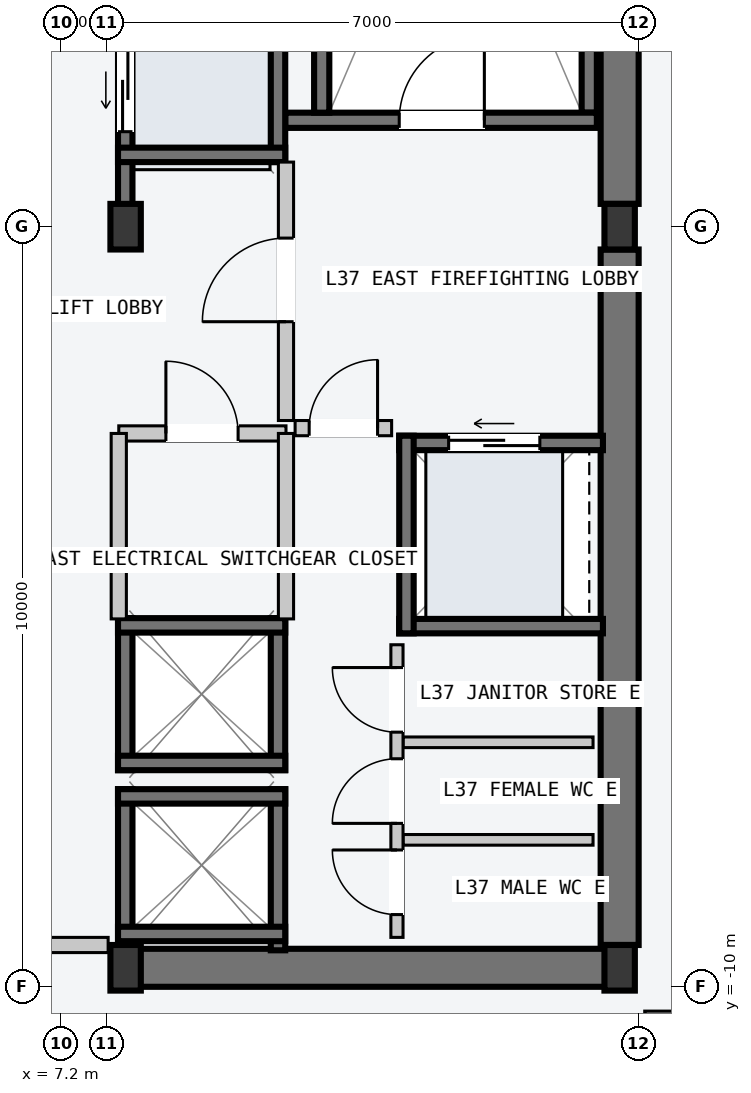
"""IFC4 building model, lengths in metres.
Left out: names, types, materials, properties, quantities, classifications, styles, units other than length and angle.
Written with IfcOpenShell. Run it as: python <this file> out.ifc"""

import sys

from ifc_helpers import new_model, si_unit, direction, frame, frame_2d, origin, origin_2d, place, context, subcontext, project, spatial, rectangle, i_section, extrude, element, fill, save


model = new_model("IFC4")
c1 = context("Model", 3, precision=1e-05, world=origin(), true_north=direction((0.0, 1.0)))
c2 = subcontext(c1, "Body", "Model", "MODEL_VIEW")
j1 = project(units=[si_unit("LENGTHUNIT", "METRE"), si_unit("PLANEANGLEUNIT", "RADIAN")], contexts=[c1])
p1 = place(None, origin())
s1 = spatial("IfcSite", under=j1, at=p1, CompositionType="ELEMENT")
p2 = place(p1, origin())
s2 = spatial("IfcBuilding", under=s1, at=p2, CompositionType="ELEMENT")
p3 = place(p2, frame((0.0, 0.0, 142.2)))
s3 = spatial("IfcBuildingStorey", under=s2, at=p3, CompositionType="ELEMENT", Elevation=142.2)
p4 = place(p3, frame((8.07, -9.75, -0.2), z_axis=(0.0, 0.0, 1.0), x_axis=(1.0, 0.0, 0.0)))
e1 = element("IfcWall", 1, at=p4, inside=s3, PredefinedType="SHEAR", context=c2, shape_type="SweptSolid", body=[
    extrude(rectangle(XDim=6.46, YDim=0.5, at=frame_2d((3.23, 0.0))), origin(), (0.0, 0.0, 1.0), 3.6),
])
for number, where, z_axis, x_axis in (
    (2, (14.55, -9.45, -0.2), (0.0, 0.0, 1.0), (0.0, 1.0, 0.0)),
    (3, (14.55, 0.3, -0.2), (0.0, 0.0, 1.0), (0.0, 1.0, 0.0)),
):
    element("IfcWall", number, at=place(p3, frame(where, z_axis=z_axis, x_axis=x_axis)), inside=s3, PredefinedType="SHEAR", context=c2, shape_type="SweptSolid", body=[
        extrude(rectangle(XDim=9.15, YDim=0.5, at=frame_2d((4.575, 0.0))), origin(), (0.0, 0.0, 1.0), 3.6),
    ])
p5 = place(p3, frame((14.15, 1.5, -0.2), z_axis=(0.0, 0.0, 1.0), x_axis=(0.0, 1.0, 0.0)))
e4 = element("IfcWall", 4, at=p5, inside=s3, PredefinedType="SOLIDWALL", context=c2, shape_type="SweptSolid", body=[
    extrude(rectangle(XDim=7.8, YDim=0.2, at=frame_2d((3.9, 0.0))), origin(), (0.0, 0.0, 1.0), 3.6),
])
p6 = place(p3, frame((10.15, 1.4, -0.2), z_axis=(0.0, 0.0, 1.0), x_axis=(1.0, 0.0, 0.0)))
e5 = element("IfcWall", 5, at=p6, inside=s3, PredefinedType="SOLIDWALL", context=c2, shape_type="SweptSolid", body=[
    extrude(rectangle(XDim=4.1, YDim=0.2, at=frame_2d((2.05, 0.0))), origin(), (0.0, 0.0, 1.0), 3.6),
])
p7 = place(p6, frame((1.5, 0.0, 0.2)))
e6 = element("IfcOpeningElement", 6, at=p7, cuts=e5, PredefinedType="OPENING", context=c2, shape_type="SweptSolid", body=[
    extrude(rectangle(XDim=1.12, YDim=2.18, at=frame_2d((0.56, 1.09))), frame((0.0, 0.11, 0.0), z_axis=(0.0, -1.0, 0.0), x_axis=(1.0, 0.0, 0.0)), (0.0, 0.0, 1.0), 0.22),
])
p8 = place(p3, frame((10.63, 1.5, -0.2), z_axis=(0.0, 0.0, 1.0), x_axis=(0.0, 1.0, 0.0)))
e7 = element("IfcWall", 7, at=p8, inside=s3, PredefinedType="SOLIDWALL", context=c2, shape_type="SweptSolid", body=[
    extrude(rectangle(XDim=7.8, YDim=0.2, at=frame_2d((3.9, 0.0))), origin(), (0.0, 0.0, 1.0), 3.6),
])
for number, where, z_axis, x_axis in (
    (8, (8.05, -9.75, 0.0), (0.0, 0.0, 1.0), (1.0, 0.0, 0.0)),
    (9, (8.05, 0.0, 0.0), (0.0, 0.0, 1.0), (1.0, 0.0, 0.0)),
    (10, (14.55, -9.75, 0.0), (0.0, 0.0, 1.0), (1.0, 0.0, 0.0)),
    (11, (14.55, 0.0, 0.0), (0.0, 0.0, 1.0), (1.0, 0.0, 0.0)),
):
    element("IfcColumn", number, at=place(p3, frame(where, z_axis=z_axis, x_axis=x_axis)), inside=s3, PredefinedType="COLUMN", context=c2, shape_type="SweptSolid", body=[
        extrude(i_section(OverallWidth=0.4, OverallDepth=0.6, WebThickness=0.022, FlangeThickness=0.036, at=origin_2d()), origin(), (0.0, 0.0, 1.0), 3.6),
    ])
p9 = place(p3, frame((8.045, 0.21, -0.2), z_axis=(0.0, 0.0, 1.0), x_axis=(0.0, 1.0, 0.0)))
e12 = element("IfcWall", 12, at=p9, inside=s3, PredefinedType="SOLIDWALL", context=c2, shape_type="SweptSolid", body=[
    extrude(rectangle(XDim=2.54, YDim=0.19, at=frame_2d((1.27, 0.0))), origin(), (0.0, 0.0, 1.0), 3.6),
])
p10 = place(p9, frame((1.04, 0.0, 0.2)))
e13 = element("IfcOpeningElement", 13, at=p10, cuts=e12, PredefinedType="OPENING", context=c2, shape_type="SweptSolid", body=[
    extrude(rectangle(XDim=1.1, YDim=2.2, at=frame_2d((0.55, 1.1))), frame((0.0, 0.105, 0.0), z_axis=(0.0, -1.0, 0.0), x_axis=(1.0, 0.0, 0.0)), (0.0, 0.0, 1.0), 0.21),
])
p11 = place(p3, frame((10.055, 0.85, -0.2), z_axis=(0.0, 0.0, 1.0), x_axis=(0.0, 1.0, 0.0)))
e14 = element("IfcWall", 14, at=p11, inside=s3, PredefinedType="SOLIDWALL", context=c2, shape_type="SweptSolid", body=[
    extrude(rectangle(XDim=1.9, YDim=0.19, at=frame_2d((0.95, 0.0))), origin(), (0.0, 0.0, 1.0), 3.6),
])
p12 = place(p3, frame((7.95, 0.945, -0.2), z_axis=(0.0, 0.0, 1.0), x_axis=(1.0, 0.0, 0.0)))
e15 = element("IfcWall", 15, at=p12, inside=s3, PredefinedType="SOLIDWALL", context=c2, shape_type="SweptSolid", body=[
    extrude(rectangle(XDim=2.2, YDim=0.19, at=frame_2d((1.1, 0.0))), origin(), (0.0, 0.0, 1.0), 3.6),
])
for number, where, z_axis, x_axis in (
    (16, (8.045, -9.52, -0.2), (0.0, 0.0, 1.0), (0.0, 1.0, 0.0)),
    (17, (10.055, -9.52, -0.2), (0.0, 0.0, 1.0), (0.0, 1.0, 0.0)),
):
    element("IfcWall", number, at=place(p3, frame(where, z_axis=z_axis, x_axis=x_axis)), inside=s3, PredefinedType="SOLIDWALL", context=c2, shape_type="SweptSolid", body=[
        extrude(rectangle(XDim=2.12, YDim=0.19, at=frame_2d((1.06, 0.0))), origin(), (0.0, 0.0, 1.0), 3.6),
    ])
for number, where, z_axis, x_axis in (
    (18, (7.95, -7.495, -0.2), (0.0, 0.0, 1.0), (1.0, 0.0, 0.0)),
    (19, (7.95, -9.305, -0.2), (0.0, 0.0, 1.0), (1.0, 0.0, 0.0)),
):
    element("IfcWall", number, at=place(p3, frame(where, z_axis=z_axis, x_axis=x_axis)), inside=s3, PredefinedType="SOLIDWALL", context=c2, shape_type="SweptSolid", body=[
        extrude(rectangle(XDim=2.2, YDim=0.19, at=frame_2d((1.1, 0.0))), origin(), (0.0, 0.0, 1.0), 3.6),
    ])
for number, where, z_axis, x_axis in (
    (20, (8.045, -7.15, -0.2), (0.0, 0.0, 1.0), (0.0, 1.0, 0.0)),
    (21, (10.055, -7.15, -0.2), (0.0, 0.0, 1.0), (0.0, 1.0, 0.0)),
):
    element("IfcWall", number, at=place(p3, frame(where, z_axis=z_axis, x_axis=x_axis)), inside=s3, PredefinedType="SOLIDWALL", context=c2, shape_type="SweptSolid", body=[
        extrude(rectangle(XDim=2.0, YDim=0.19, at=frame_2d((1.0, 0.0))), origin(), (0.0, 0.0, 1.0), 3.6),
    ])
for number, where, z_axis, x_axis in (
    (22, (7.95, -5.245, -0.2), (0.0, 0.0, 1.0), (1.0, 0.0, 0.0)),
    (23, (7.95, -7.055, -0.2), (0.0, 0.0, 1.0), (1.0, 0.0, 0.0)),
):
    element("IfcWall", number, at=place(p3, frame(where, z_axis=z_axis, x_axis=x_axis)), inside=s3, PredefinedType="SOLIDWALL", context=c2, shape_type="SweptSolid", body=[
        extrude(rectangle(XDim=2.2, YDim=0.19, at=frame_2d((1.1, 0.0))), origin(), (0.0, 0.0, 1.0), 3.6),
    ])
p13 = place(p3, frame((11.65, -2.845, -0.2), z_axis=(0.0, 0.0, 1.0), x_axis=(1.0, 0.0, 0.0)))
e24 = element("IfcWall", 24, at=p13, inside=s3, PredefinedType="SOLIDWALL", context=c2, shape_type="SweptSolid", body=[
    extrude(rectangle(XDim=2.68, YDim=0.19, at=frame_2d((1.34, 0.0))), origin(), (0.0, 0.0, 1.0), 3.6),
])
p14 = place(p13, frame((0.65, 0.0, 0.2)))
e25 = element("IfcOpeningElement", 25, at=p14, cuts=e24, PredefinedType="OPENING", context=c2, shape_type="SweptSolid", body=[
    extrude(rectangle(XDim=1.2, YDim=2.2, at=frame_2d((0.6, 1.1))), frame((0.0, 0.105, 0.0), z_axis=(0.0, -1.0, 0.0), x_axis=(1.0, 0.0, 0.0)), (0.0, 0.0, 1.0), 0.21),
])
p15 = place(p3, frame((11.65, -5.255, -0.2), z_axis=(0.0, 0.0, 1.0), x_axis=(1.0, 0.0, 0.0)))
e26 = element("IfcWall", 26, at=p15, inside=s3, PredefinedType="SOLIDWALL", context=c2, shape_type="SweptSolid", body=[
    extrude(rectangle(XDim=2.68, YDim=0.19, at=frame_2d((1.34, 0.0))), origin(), (0.0, 0.0, 1.0), 3.6),
])
p16 = place(p3, frame((11.745, -5.35, -0.2), z_axis=(0.0, 0.0, 1.0), x_axis=(0.0, 1.0, 0.0)))
e27 = element("IfcWall", 27, at=p16, inside=s3, PredefinedType="SOLIDWALL", context=c2, shape_type="SweptSolid", body=[
    extrude(rectangle(XDim=2.6, YDim=0.19, at=frame_2d((1.3, 0.0))), origin(), (0.0, 0.0, 1.0), 3.6),
])
p17 = place(p3, frame((6.02, -9.45, 0.0), z_axis=(0.0, 0.0, 1.0), x_axis=(1.0, 0.0, 0.0)))
e28 = element("IfcWall", 28, at=p17, inside=s3, PredefinedType="PARTITIONING", context=c2, shape_type="SweptSolid", body=[
    extrude(rectangle(XDim=1.8, YDim=0.2, at=frame_2d((0.9, 0.0))), origin(), (0.0, 0.0, 1.0), 3.4),
])
p18 = place(p3, frame((10.16, -2.55, 0.0), z_axis=(0.0, 0.0, 1.0), x_axis=(0.0, 1.0, 0.0)))
e29 = element("IfcWall", 29, at=p18, inside=s3, PredefinedType="PARTITIONING", context=c2, shape_type="SweptSolid", body=[
    extrude(rectangle(XDim=3.4, YDim=0.2, at=frame_2d((1.7, 0.0))), origin(), (0.0, 0.0, 1.0), 3.4),
])
p19 = place(p18, frame((1.3, 0.0, 0.0)))
e30 = element("IfcOpeningElement", 30, at=p19, cuts=e29, PredefinedType="OPENING", context=c2, shape_type="SweptSolid", body=[
    extrude(rectangle(XDim=1.1, YDim=2.15, at=frame_2d((0.55, 1.075))), frame((0.0, 0.11, 0.0), z_axis=(0.0, -1.0, 0.0), x_axis=(1.0, 0.0, 0.0)), (0.0, 0.0, 1.0), 0.22),
])
p20 = place(p3, frame((10.28, -2.65, 0.0), z_axis=(0.0, 0.0, 1.0), x_axis=(1.0, 0.0, 0.0)))
e31 = element("IfcWall", 31, at=p20, inside=s3, PredefinedType="PARTITIONING", context=c2, shape_type="SweptSolid", body=[
    extrude(rectangle(XDim=1.27, YDim=0.2, at=frame_2d((0.635, 0.0))), origin(), (0.0, 0.0, 1.0), 3.4),
])
p21 = place(p20, frame((0.185, 0.0, 0.0)))
e32 = element("IfcOpeningElement", 32, at=p21, cuts=e31, PredefinedType="OPENING", context=c2, shape_type="SweptSolid", body=[
    extrude(rectangle(XDim=0.9, YDim=2.15, at=frame_2d((0.45, 1.075))), frame((0.0, 0.11, 0.0), z_axis=(0.0, -1.0, 0.0), x_axis=(1.0, 0.0, 0.0)), (0.0, 0.0, 1.0), 0.22),
])
p22 = place(p3, frame((7.96, -2.72, 0.0), z_axis=(0.0, 0.0, 1.0), x_axis=(1.0, 0.0, 0.0)))
e33 = element("IfcWall", 33, at=p22, inside=s3, PredefinedType="PARTITIONING", context=c2, shape_type="SweptSolid", body=[
    extrude(rectangle(XDim=2.2, YDim=0.2, at=frame_2d((1.1, 0.0))), origin(), (0.0, 0.0, 1.0), 3.4),
])
p23 = place(p22, frame((0.62, 0.0, 0.0)))
e34 = element("IfcOpeningElement", 34, at=p23, cuts=e33, PredefinedType="OPENING", context=c2, shape_type="SweptSolid", body=[
    extrude(rectangle(XDim=0.95, YDim=2.1, at=frame_2d((0.475, 1.05))), frame((0.0, 0.11, 0.0), z_axis=(0.0, -1.0, 0.0), x_axis=(1.0, 0.0, 0.0)), (0.0, 0.0, 1.0), 0.22),
])
for number, where, z_axis, x_axis in (
    (35, (7.96, -5.16, 0.0), (0.0, 0.0, 1.0), (0.0, 1.0, 0.0)),
    (36, (10.16, -5.16, 0.0), (0.0, 0.0, 1.0), (0.0, 1.0, 0.0)),
):
    element("IfcWall", number, at=place(p3, frame(where, z_axis=z_axis, x_axis=x_axis)), inside=s3, PredefinedType="PARTITIONING", context=c2, shape_type="SweptSolid", body=[
        extrude(rectangle(XDim=2.44, YDim=0.2, at=frame_2d((1.22, 0.0))), origin(), (0.0, 0.0, 1.0), 3.4),
    ])
for number, where, z_axis, x_axis in (
    (37, (11.7, -8.067, 0.0), (0.0, 0.0, 1.0), (1.0, 0.0, 0.0)),
    (38, (11.7, -6.783, 0.0), (0.0, 0.0, 1.0), (1.0, 0.0, 0.0)),
):
    element("IfcWall", number, at=place(p3, frame(where, z_axis=z_axis, x_axis=x_axis)), inside=s3, PredefinedType="PARTITIONING", context=c2, shape_type="SweptSolid", body=[
        extrude(rectangle(XDim=2.5, YDim=0.14, at=frame_2d((1.25, 0.0))), origin(), (0.0, 0.0, 1.0), 3.4),
    ])
p24 = place(p3, frame((11.62, -9.35, 0.0), z_axis=(0.0, 0.0, 1.0), x_axis=(0.0, 1.0, 0.0)))
e39 = element("IfcWall", 39, at=p24, inside=s3, PredefinedType="PARTITIONING", context=c2, shape_type="SweptSolid", body=[
    extrude(rectangle(XDim=3.85, YDim=0.16, at=frame_2d((1.925, 0.0))), origin(), (0.0, 0.0, 1.0), 3.4),
])
p25 = place(p24, frame((0.3, 0.0, 0.0)))
e40 = element("IfcOpeningElement", 40, at=p25, cuts=e39, PredefinedType="OPENING", context=c2, shape_type="SweptSolid", body=[
    extrude(rectangle(XDim=0.85, YDim=2.12, at=frame_2d((0.425, 1.06))), frame((0.0, 0.09, 0.0), z_axis=(0.0, -1.0, 0.0), x_axis=(1.0, 0.0, 0.0)), (0.0, 0.0, 1.0), 0.18),
])
p26 = place(p24, frame((1.5, 0.0, 0.0)))
e41 = element("IfcOpeningElement", 41, at=p26, cuts=e39, PredefinedType="OPENING", context=c2, shape_type="SweptSolid", body=[
    extrude(rectangle(XDim=0.85, YDim=2.12, at=frame_2d((0.425, 1.06))), frame((0.0, 0.09, 0.0), z_axis=(0.0, -1.0, 0.0), x_axis=(1.0, 0.0, 0.0)), (0.0, 0.0, 1.0), 0.18),
])
p27 = place(p24, frame((2.7, 0.0, 0.0)))
e42 = element("IfcOpeningElement", 42, at=p27, cuts=e39, PredefinedType="OPENING", context=c2, shape_type="SweptSolid", body=[
    extrude(rectangle(XDim=0.85, YDim=2.12, at=frame_2d((0.425, 1.06))), frame((0.0, 0.09, 0.0), z_axis=(0.0, -1.0, 0.0), x_axis=(1.0, 0.0, 0.0)), (0.0, 0.0, 1.0), 0.18),
])
p28 = place(p3, frame((14.88, -10.4, 0.0), z_axis=(0.0, 0.0, 1.0), x_axis=(1.0, 0.0, 0.0)))
e43 = element("IfcWall", 43, at=p28, inside=s3, PredefinedType="PARTITIONING", context=c2, shape_type="SweptSolid", body=[
    extrude(rectangle(XDim=7.68, YDim=0.16, at=frame_2d((3.84, 0.0))), origin(), (0.0, 0.0, 1.0), 3.4),
])
p29 = place(p28, frame((3.36, 0.0, 0.0)))
e44 = element("IfcOpeningElement", 44, at=p29, cuts=e43, PredefinedType="OPENING", context=c2, shape_type="SweptSolid", body=[
    extrude(rectangle(XDim=0.96, YDim=2.18, at=frame_2d((0.48, 1.09))), frame((0.0, 0.09, 0.0), z_axis=(0.0, -1.0, 0.0), x_axis=(1.0, 0.0, 0.0)), (0.0, 0.0, 1.0), 0.18),
])
p30 = place(p7, origin())
e45 = element("IfcDoor", 45, at=p30, inside=s3, OperationType="SINGLE_SWING_RIGHT", PredefinedType="DOOR", context=c2, shape_type="SweptSolid", body=[
    extrude(rectangle(XDim=1.12, YDim=2.18, at=frame_2d((0.56, 1.09))), frame((0.0, 0.025, 0.0), z_axis=(0.0, -1.0, 0.0), x_axis=(1.0, 0.0, 0.0)), (0.0, 0.0, 1.0), 0.05),
])
fill(e6, e45)
p31 = place(p10, origin())
e46 = element("IfcDoor", 46, at=p31, inside=s3, OperationType="SLIDING_TO_LEFT", PredefinedType="DOOR", context=c2, shape_type="SweptSolid", body=[
    extrude(rectangle(XDim=1.1, YDim=2.2, at=frame_2d((0.55, 1.1))), frame((0.0, 0.025, 0.0), z_axis=(0.0, -1.0, 0.0), x_axis=(1.0, 0.0, 0.0)), (0.0, 0.0, 1.0), 0.05),
])
fill(e13, e46)
p32 = place(p14, origin())
e47 = element("IfcDoor", 47, at=p32, inside=s3, OperationType="SLIDING_TO_LEFT", PredefinedType="DOOR", context=c2, shape_type="SweptSolid", body=[
    extrude(rectangle(XDim=1.2, YDim=2.2, at=frame_2d((0.6, 1.1))), frame((0.0, 0.025, 0.0), z_axis=(0.0, -1.0, 0.0), x_axis=(1.0, 0.0, 0.0)), (0.0, 0.0, 1.0), 0.05),
])
fill(e25, e47)
p33 = place(p19, origin())
e48 = element("IfcDoor", 48, at=p33, inside=s3, OperationType="SINGLE_SWING_LEFT", PredefinedType="DOOR", context=c2, shape_type="SweptSolid", body=[
    extrude(rectangle(XDim=1.1, YDim=2.15, at=frame_2d((0.55, 1.075))), frame((0.0, 0.025, 0.0), z_axis=(0.0, -1.0, 0.0), x_axis=(1.0, 0.0, 0.0)), (0.0, 0.0, 1.0), 0.05),
])
fill(e30, e48)
p34 = place(p21, origin())
e49 = element("IfcDoor", 49, at=p34, inside=s3, OperationType="SINGLE_SWING_RIGHT", PredefinedType="DOOR", context=c2, shape_type="SweptSolid", body=[
    extrude(rectangle(XDim=0.9, YDim=2.15, at=frame_2d((0.45, 1.075))), frame((0.0, 0.025, 0.0), z_axis=(0.0, -1.0, 0.0), x_axis=(1.0, 0.0, 0.0)), (0.0, 0.0, 1.0), 0.05),
])
fill(e32, e49)
p35 = place(p23, origin())
e50 = element("IfcDoor", 50, at=p35, inside=s3, OperationType="SINGLE_SWING_LEFT", PredefinedType="DOOR", context=c2, shape_type="SweptSolid", body=[
    extrude(rectangle(XDim=0.95, YDim=2.1, at=frame_2d((0.475, 1.05))), frame((0.0, 0.025, 0.0), z_axis=(0.0, -1.0, 0.0), x_axis=(1.0, 0.0, 0.0)), (0.0, 0.0, 1.0), 0.05),
])
fill(e34, e50)
p36 = place(p25, origin())
e51 = element("IfcDoor", 51, at=p36, inside=s3, OperationType="SINGLE_SWING_RIGHT", PredefinedType="DOOR", context=c2, shape_type="SweptSolid", body=[
    extrude(rectangle(XDim=0.85, YDim=2.12, at=frame_2d((0.425, 1.06))), frame((0.0, 0.025, 0.0), z_axis=(0.0, -1.0, 0.0), x_axis=(1.0, 0.0, 0.0)), (0.0, 0.0, 1.0), 0.05),
])
fill(e40, e51)
p37 = place(p26, origin())
e52 = element("IfcDoor", 52, at=p37, inside=s3, OperationType="SINGLE_SWING_LEFT", PredefinedType="DOOR", context=c2, shape_type="SweptSolid", body=[
    extrude(rectangle(XDim=0.85, YDim=2.12, at=frame_2d((0.425, 1.06))), frame((0.0, 0.025, 0.0), z_axis=(0.0, -1.0, 0.0), x_axis=(1.0, 0.0, 0.0)), (0.0, 0.0, 1.0), 0.05),
])
fill(e41, e52)
p38 = place(p27, origin())
e53 = element("IfcDoor", 53, at=p38, inside=s3, OperationType="SINGLE_SWING_RIGHT", PredefinedType="DOOR", context=c2, shape_type="SweptSolid", body=[
    extrude(rectangle(XDim=0.85, YDim=2.12, at=frame_2d((0.425, 1.06))), frame((0.0, 0.025, 0.0), z_axis=(0.0, -1.0, 0.0), x_axis=(1.0, 0.0, 0.0)), (0.0, 0.0, 1.0), 0.05),
])
fill(e42, e53)
save(model, sys.argv[1])
